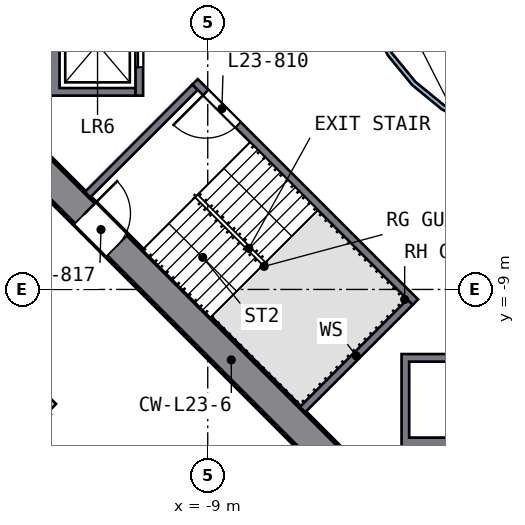
"""IFC4 building model, lengths in metres.
Left out: names, types, materials, properties, quantities, classifications, styles, units other than length and angle.
Written with IfcOpenShell. Run it as: python <this file> out.ifc"""

import sys

from ifc_helpers import new_model, si_unit, direction, frame, frame_2d, origin, place, context, subcontext, project, spatial, polyline, rectangle, outline, extrude, element, fill, save


model = new_model("IFC4")
c1 = context("Model", 3, precision=1e-05, world=origin(), true_north=direction((0.0, 1.0)))
c2 = subcontext(c1, "Body", "Model", "MODEL_VIEW")
j1 = project(units=[si_unit("LENGTHUNIT", "METRE"), si_unit("PLANEANGLEUNIT", "RADIAN")], contexts=[c1])
p1 = place(None, origin())
s1 = spatial("IfcSite", under=j1, at=p1, CompositionType="ELEMENT")
p2 = place(p1, origin())
s2 = spatial("IfcBuilding", under=s1, at=p2, CompositionType="ELEMENT")
p3 = place(p2, frame((0.0, 0.0, 100.0)))
s3 = spatial("IfcBuildingStorey", under=s2, at=p3, CompositionType="ELEMENT", Elevation=100.0)
p4 = place(p3, frame((-13.717, -5.516, 0.0), z_axis=(0.0, 0.0, 1.0), x_axis=(0.707106781, -0.707106781, 0.0)))
e1 = element("IfcWall", 1, at=p4, inside=s3, PredefinedType="SHEAR", context=c2, shape_type="SweptSolid", body=[
    extrude(rectangle(XDim=11.598, YDim=0.8, at=frame_2d((5.799, 0.0))), origin(), (0.0, 0.0, 1.0), 3.5),
])
p5 = place(p4, frame((2.099, 0.0, 0.0)))
e2 = element("IfcOpeningElement", 2, at=p5, cuts=e1, PredefinedType="OPENING", context=c2, shape_type="SweptSolid", body=[
    extrude(rectangle(XDim=1.2, YDim=2.1, at=frame_2d((0.6, 1.05))), frame((0.0, 0.41, 0.0), z_axis=(0.0, -1.0, 0.0), x_axis=(1.0, 0.0, 0.0)), (0.0, 0.0, 1.0), 0.82),
])
p6 = place(p3, origin())
e3 = element("IfcWall", 3, at=p6, inside=s3, PredefinedType="SOLIDWALL", context=c2, shape_type="SweptSolid", body=[
    extrude(outline(polyline([(-13.2, -3.9), (-13.2, -1.2), (-10.9, -1.2), (-10.9, -1.4), (-12.9, -1.4), (-12.9, -3.7), (-10.9, -3.7), (-10.9, -3.9), (-13.2, -3.9)])), origin(), (0.0, 0.0, 1.0), 3.19),
])
p7 = place(p3, frame((-10.8, -1.2, 0.0), z_axis=(0.0, 0.0, 1.0), x_axis=(0.0, -1.0, 0.0)))
e4 = element("IfcWall", 4, at=p7, inside=s3, PredefinedType="SOLIDWALL", context=c2, shape_type="SweptSolid", body=[
    extrude(rectangle(XDim=2.7, YDim=0.2, at=frame_2d((1.35, 0.0))), origin(), (0.0, 0.0, 1.0), 3.19),
])
p8 = place(p7, frame((0.75, 0.0, 0.0)))
e5 = element("IfcOpeningElement", 5, at=p8, cuts=e4, PredefinedType="OPENING", context=c2, shape_type="SweptSolid", body=[
    extrude(rectangle(XDim=1.2, YDim=2.1, at=frame_2d((0.6, 1.05))), frame((0.0, 0.11, 0.0), z_axis=(0.0, -1.0, 0.0), x_axis=(1.0, 0.0, 0.0)), (0.0, 0.0, 1.0), 0.22),
])
p9 = place(p3, origin())
e6 = element("IfcWall", 6, at=p9, inside=s3, PredefinedType="SOLIDWALL", context=c2, shape_type="SweptSolid", body=[
    extrude(outline(polyline([(-1.2, -13.2), (-3.9, -13.2), (-3.9, -10.7), (-1.2, -10.7), (-1.2, -13.2)]), holes=[polyline([(-3.7, -10.9), (-3.7, -12.9), (-1.4, -12.9), (-1.4, -10.9), (-3.7, -10.9)])]), origin(), (0.0, 0.0, 1.0), 3.19),
])
p10 = place(p3, frame((-3.535, -9.334, 0.0), z_axis=(0.0, 0.0, 1.0), x_axis=(-0.707106781, 0.707106781, 0.0)))
e7 = element("IfcWall", 7, at=p10, inside=s3, PredefinedType="SOLIDWALL", context=c2, shape_type="SweptSolid", body=[
    extrude(rectangle(XDim=8.2, YDim=0.2, at=frame_2d((4.1, 0.0))), origin(), (0.0, 0.0, 1.0), 3.19),
])
p11 = place(p10, frame((6.6, 0.0, 0.0)))
e8 = element("IfcOpeningElement", 8, at=p11, cuts=e7, PredefinedType="OPENING", context=c2, shape_type="SweptSolid", body=[
    extrude(rectangle(XDim=1.2, YDim=2.1, at=frame_2d((0.6, 1.05))), frame((0.0, 0.11, 0.0), z_axis=(0.0, -1.0, 0.0), x_axis=(1.0, 0.0, 0.0)), (0.0, 0.0, 1.0), 0.22),
])
for number, where, z_axis, x_axis in (
    (9, (-9.334, -3.677, 0.0), (0.0, 0.0, 1.0), (-0.707, -0.707, 0.0)),
    (10, (-3.677, -9.334, 0.0), (0.0, 0.0, 1.0), (-0.707, -0.707, 0.0)),
):
    element("IfcWall", number, at=place(p3, frame(where, z_axis=z_axis, x_axis=x_axis)), inside=s3, PredefinedType="SOLIDWALL", context=c2, shape_type="SweptSolid", body=[
        extrude(rectangle(XDim=4.0, YDim=0.2, at=frame_2d((2.0, 0.0))), origin(), (0.0, 0.0, 1.0), 3.19),
    ])
p12 = place(p3, origin())
e11 = element("IfcWall", 11, at=p12, inside=s3, PredefinedType="SOLIDWALL", context=c2, shape_type="SweptSolid", body=[
    extrude(outline(polyline([(5.021, -0.999), (4.73, -1.959), (4.257, -2.844), (3.62, -3.62), (2.844, -4.257), (1.959, -4.73), (0.999, -5.021), (0.0, -5.12), (-0.999, -5.021), (-1.959, -4.73), (-2.844, -4.257), (-3.62, -3.62), (-4.257, -2.844), (-4.73, -1.959), (-5.021, -0.999), (-5.12, 0.0), (-5.021, 0.999), (-4.73, 1.959), (-4.257, 2.844), (-3.62, 3.62), (-2.844, 4.257), (-1.959, 4.73), (-0.999, 5.021), (0.0, 5.12), (0.999, 5.021), (1.959, 4.73), (2.844, 4.257), (3.62, 3.62), (4.257, 2.844), (4.73, 1.959), (5.021, 0.999), (5.12, 0.0), (5.021, -0.999)]), holes=[polyline([(4.904, 0.976), (4.619, 1.913), (4.157, 2.778), (3.535, 3.535), (2.778, 4.157), (1.913, 4.619), (0.976, 4.904), (0.0, 5.0), (-0.976, 4.904), (-1.913, 4.619), (-2.778, 4.157), (-3.535, 3.535), (-4.157, 2.778), (-4.619, 1.913), (-4.904, 0.976), (-5.0, 0.0), (-4.904, -0.976), (-4.619, -1.913), (-4.157, -2.778), (-3.535, -3.535), (-2.778, -4.157), (-1.913, -4.619), (-0.976, -4.904), (0.0, -5.0), (0.976, -4.904), (1.913, -4.619), (2.778, -4.157), (3.535, -3.535), (4.157, -2.778), (4.619, -1.913), (4.904, -0.976), (5.0, 0.0), (4.904, 0.976)])]), origin(), (0.0, 0.0, 1.0), 3.19),
])
p13 = place(p3, frame((-15.519, -9.735, 0.0), z_axis=(0.0, 0.0, 1.0), x_axis=(0.723184346, -0.690655053, 0.0)))
e12 = element("IfcWall", 12, at=p13, inside=s3, PredefinedType="SOLIDWALL", context=c2, shape_type="SweptSolid", body=[
    extrude(rectangle(XDim=3.4, YDim=0.2, at=frame_2d((1.7, 0.0))), origin(), (0.0, 0.0, 1.0), 3.19),
])
p14 = place(p8, origin())
e13 = element("IfcDoor", 13, at=p14, inside=s3, OperationType="DOUBLE_DOOR_SLIDING", PredefinedType="DOOR", context=c2, shape_type="SweptSolid", body=[
    extrude(rectangle(XDim=1.2, YDim=2.1, at=frame_2d((0.6, 1.05))), frame((0.0, 0.025, 0.0), z_axis=(0.0, -1.0, 0.0), x_axis=(1.0, 0.0, 0.0)), (0.0, 0.0, 1.0), 0.05),
])
fill(e5, e13)
p15 = place(p11, origin())
e14 = element("IfcDoor", 14, at=p15, inside=s3, OperationType="SINGLE_SWING_RIGHT", PredefinedType="DOOR", context=c2, shape_type="SweptSolid", body=[
    extrude(rectangle(XDim=1.2, YDim=2.1, at=frame_2d((0.6, 1.05))), frame((0.0, 0.025, 0.0), z_axis=(0.0, -1.0, 0.0), x_axis=(1.0, 0.0, 0.0)), (0.0, 0.0, 1.0), 0.05),
])
fill(e8, e14)
p16 = place(p5, origin())
e15 = element("IfcDoor", 15, at=p16, inside=s3, OperationType="SINGLE_SWING_LEFT", PredefinedType="DOOR", context=c2, shape_type="SweptSolid", body=[
    extrude(rectangle(XDim=1.2, YDim=2.1, at=frame_2d((0.6, 1.05))), frame((0.0, 0.025, 0.0), z_axis=(0.0, -1.0, 0.0), x_axis=(1.0, 0.0, 0.0)), (0.0, 0.0, 1.0), 0.05),
])
fill(e2, e15)
save(model, sys.argv[1])
